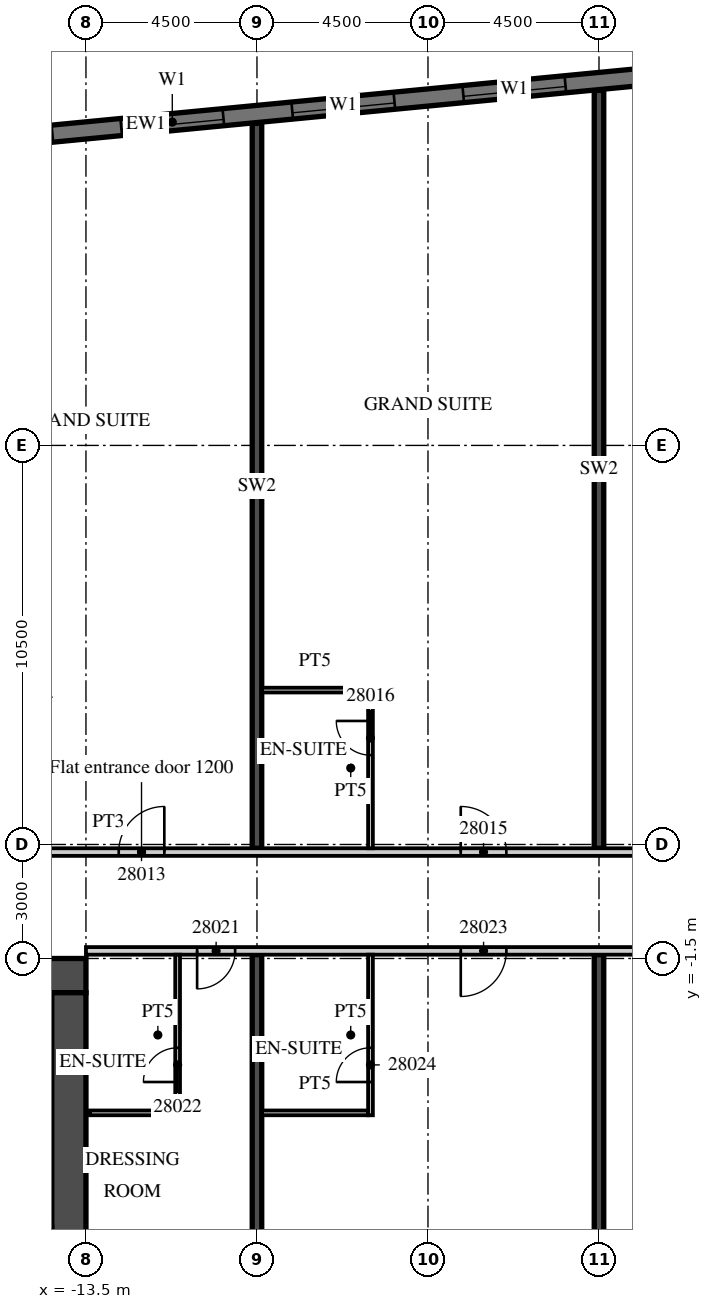
"""IFC4 building model, lengths in metres.
Left out: names, types, materials, properties, quantities, classifications, styles, units other than length and angle.
Written with IfcOpenShell. Run it as: python <this file> out.ifc"""

import sys

from ifc_helpers import new_model, si_unit, direction, frame, frame_2d, origin, place, context, subcontext, project, spatial, rectangle, extrude, element, fill, save


model = new_model("IFC4")
c1 = context("Model", 3, precision=1e-05, world=origin(), true_north=direction((0.0, 1.0)))
c2 = subcontext(c1, "Body", "Model", "MODEL_VIEW")
j1 = project(units=[si_unit("LENGTHUNIT", "METRE"), si_unit("PLANEANGLEUNIT", "RADIAN")], contexts=[c1])
p1 = place(None, origin())
s1 = spatial("IfcSite", under=j1, at=p1, CompositionType="ELEMENT")
p2 = place(p1, origin())
s2 = spatial("IfcBuilding", under=s1, at=p2, CompositionType="ELEMENT")
p3 = place(p2, frame((0.0, 0.0, 127.3)))
s3 = spatial("IfcBuildingStorey", under=s2, at=p3, CompositionType="ELEMENT", Elevation=127.3)
p4 = place(p3, frame((-9.0, -21.777, 0.0), z_axis=(0.0, 0.0, 1.0), x_axis=(0.0, 1.0, 0.0)))
e1 = element("IfcWall", 1, at=p4, inside=s3, PredefinedType="SHEAR", context=c2, shape_type="SweptSolid", body=[
    extrude(rectangle(XDim=20.377, YDim=0.25, at=frame_2d((10.188, 0.0))), origin(), (0.0, 0.0, 1.0), 3.3),
])
p5 = place(p3, frame((-9.0, 1.4, 0.0), z_axis=(0.0, 0.0, 1.0), x_axis=(0.0, 1.0, 0.0)))
e2 = element("IfcWall", 2, at=p5, inside=s3, PredefinedType="SHEAR", context=c2, shape_type="SweptSolid", body=[
    extrude(rectangle(XDim=19.073, YDim=0.25, at=frame_2d((9.537, 0.0))), origin(), (0.0, 0.0, 1.0), 3.3),
])
p6 = place(p3, frame((0.0, -20.91, 0.0), z_axis=(0.0, 0.0, 1.0), x_axis=(0.0, 1.0, 0.0)))
e3 = element("IfcWall", 3, at=p6, inside=s3, PredefinedType="SHEAR", context=c2, shape_type="SweptSolid", body=[
    extrude(rectangle(XDim=19.51, YDim=0.25, at=frame_2d((9.755, 0.0))), origin(), (0.0, 0.0, 1.0), 3.3),
])
p7 = place(p3, frame((0.0, 1.4, 0.0), z_axis=(0.0, 0.0, 1.0), x_axis=(0.0, 1.0, 0.0)))
e4 = element("IfcWall", 4, at=p7, inside=s3, PredefinedType="SHEAR", context=c2, shape_type="SweptSolid", body=[
    extrude(rectangle(XDim=19.94, YDim=0.25, at=frame_2d((9.97, 0.0))), origin(), (0.0, 0.0, 1.0), 3.3),
])
p8 = place(p3, frame((13.521, 22.89, 0.0), z_axis=(0.0, 0.0, 1.0), x_axis=(-0.995396445054, -0.095843190545, 0.0)))
e5 = element("IfcWall", 5, at=p8, inside=s3, PredefinedType="SOLIDWALL", context=c2, shape_type="SweptSolid", body=[
    extrude(rectangle(XDim=51.114, YDim=0.45, at=frame_2d((25.557, 0.0))), origin(), (0.0, 0.0, 1.0), 3.02),
])
p9 = place(p8, frame((0.91, 0.0, 0.45)))
e6 = element("IfcOpeningElement", 6, at=p9, cuts=e5, PredefinedType="OPENING", context=c2, shape_type="SweptSolid", body=[
    extrude(rectangle(XDim=2.7, YDim=2.25, at=frame_2d((1.35, 1.125))), frame((0.0, 0.235, 0.0), z_axis=(0.0, -1.0, 0.0), x_axis=(1.0, 0.0, 0.0)), (0.0, 0.0, 1.0), 0.47),
])
p10 = place(p8, frame((5.431, 0.0, 0.45)))
e7 = element("IfcOpeningElement", 7, at=p10, cuts=e5, PredefinedType="OPENING", context=c2, shape_type="SweptSolid", body=[
    extrude(rectangle(XDim=2.7, YDim=2.25, at=frame_2d((1.35, 1.125))), frame((0.0, 0.235, 0.0), z_axis=(0.0, -1.0, 0.0), x_axis=(1.0, 0.0, 0.0)), (0.0, 0.0, 1.0), 0.47),
])
p11 = place(p8, frame((9.952, 0.0, 0.45)))
e8 = element("IfcOpeningElement", 8, at=p11, cuts=e5, PredefinedType="OPENING", context=c2, shape_type="SweptSolid", body=[
    extrude(rectangle(XDim=2.7, YDim=2.25, at=frame_2d((1.35, 1.125))), frame((0.0, 0.235, 0.0), z_axis=(0.0, -1.0, 0.0), x_axis=(1.0, 0.0, 0.0)), (0.0, 0.0, 1.0), 0.47),
])
p12 = place(p8, frame((14.473, 0.0, 0.45)))
e9 = element("IfcOpeningElement", 9, at=p12, cuts=e5, PredefinedType="OPENING", context=c2, shape_type="SweptSolid", body=[
    extrude(rectangle(XDim=2.7, YDim=2.25, at=frame_2d((1.35, 1.125))), frame((0.0, 0.235, 0.0), z_axis=(0.0, -1.0, 0.0), x_axis=(1.0, 0.0, 0.0)), (0.0, 0.0, 1.0), 0.47),
])
p13 = place(p8, frame((18.994, 0.0, 0.45)))
e10 = element("IfcOpeningElement", 10, at=p13, cuts=e5, PredefinedType="OPENING", context=c2, shape_type="SweptSolid", body=[
    extrude(rectangle(XDim=2.7, YDim=2.25, at=frame_2d((1.35, 1.125))), frame((0.0, 0.235, 0.0), z_axis=(0.0, -1.0, 0.0), x_axis=(1.0, 0.0, 0.0)), (0.0, 0.0, 1.0), 0.47),
])
p14 = place(p8, frame((23.514, 0.0, 0.45)))
e11 = element("IfcOpeningElement", 11, at=p14, cuts=e5, PredefinedType="OPENING", context=c2, shape_type="SweptSolid", body=[
    extrude(rectangle(XDim=2.7, YDim=2.25, at=frame_2d((1.35, 1.125))), frame((0.0, 0.235, 0.0), z_axis=(0.0, -1.0, 0.0), x_axis=(1.0, 0.0, 0.0)), (0.0, 0.0, 1.0), 0.47),
])
p15 = place(p8, frame((28.035, 0.0, 0.45)))
e12 = element("IfcOpeningElement", 12, at=p15, cuts=e5, PredefinedType="OPENING", context=c2, shape_type="SweptSolid", body=[
    extrude(rectangle(XDim=2.7, YDim=2.25, at=frame_2d((1.35, 1.125))), frame((0.0, 0.235, 0.0), z_axis=(0.0, -1.0, 0.0), x_axis=(1.0, 0.0, 0.0)), (0.0, 0.0, 1.0), 0.47),
])
p16 = place(p8, frame((32.556, 0.0, 0.45)))
e13 = element("IfcOpeningElement", 13, at=p16, cuts=e5, PredefinedType="OPENING", context=c2, shape_type="SweptSolid", body=[
    extrude(rectangle(XDim=2.7, YDim=2.25, at=frame_2d((1.35, 1.125))), frame((0.0, 0.235, 0.0), z_axis=(0.0, -1.0, 0.0), x_axis=(1.0, 0.0, 0.0)), (0.0, 0.0, 1.0), 0.47),
])
p17 = place(p8, frame((37.077, 0.0, 0.45)))
e14 = element("IfcOpeningElement", 14, at=p17, cuts=e5, PredefinedType="OPENING", context=c2, shape_type="SweptSolid", body=[
    extrude(rectangle(XDim=2.7, YDim=2.25, at=frame_2d((1.35, 1.125))), frame((0.0, 0.235, 0.0), z_axis=(0.0, -1.0, 0.0), x_axis=(1.0, 0.0, 0.0)), (0.0, 0.0, 1.0), 0.47),
])
p18 = place(p8, frame((41.598, 0.0, 0.45)))
e15 = element("IfcOpeningElement", 15, at=p18, cuts=e5, PredefinedType="OPENING", context=c2, shape_type="SweptSolid", body=[
    extrude(rectangle(XDim=2.7, YDim=2.25, at=frame_2d((1.35, 1.125))), frame((0.0, 0.235, 0.0), z_axis=(0.0, -1.0, 0.0), x_axis=(1.0, 0.0, 0.0)), (0.0, 0.0, 1.0), 0.47),
])
p19 = place(p8, frame((46.118, 0.0, 0.45)))
e16 = element("IfcOpeningElement", 16, at=p19, cuts=e5, PredefinedType="OPENING", context=c2, shape_type="SweptSolid", body=[
    extrude(rectangle(XDim=2.7, YDim=2.25, at=frame_2d((1.35, 1.125))), frame((0.0, 0.235, 0.0), z_axis=(0.0, -1.0, 0.0), x_axis=(1.0, 0.0, 0.0)), (0.0, 0.0, 1.0), 0.47),
])
p20 = place(p3, frame((-39.316, 1.3, 0.0), z_axis=(0.0, 0.0, 1.0), x_axis=(1.0, 0.0, 0.0)))
e17 = element("IfcWall", 17, at=p20, inside=s3, PredefinedType="PARTITIONING", context=c2, shape_type="SweptSolid", body=[
    extrude(rectangle(XDim=52.816, YDim=0.2, at=frame_2d((26.408, 0.0))), origin(), (0.0, 0.0, 1.0), 3.02),
])
p21 = place(p20, frame((0.15, 0.0, 0.0)))
e18 = element("IfcOpeningElement", 18, at=p21, cuts=e17, PredefinedType="OPENING", context=c2, shape_type="SweptSolid", body=[
    extrude(rectangle(XDim=0.9, YDim=2.1, at=frame_2d((0.45, 1.05))), frame((0.0, 0.11, 0.0), z_axis=(0.0, -1.0, 0.0), x_axis=(1.0, 0.0, 0.0)), (0.0, 0.0, 1.0), 0.22),
])
p22 = place(p20, frame((3.891, 0.0, 0.0)))
e19 = element("IfcOpeningElement", 19, at=p22, cuts=e17, PredefinedType="OPENING", context=c2, shape_type="SweptSolid", body=[
    extrude(rectangle(XDim=1.0, YDim=2.1, at=frame_2d((0.5, 1.05))), frame((0.0, 0.11, 0.0), z_axis=(0.0, -1.0, 0.0), x_axis=(1.0, 0.0, 0.0)), (0.0, 0.0, 1.0), 0.22),
])
p23 = place(p20, frame((10.741, 0.0, 0.0)))
e20 = element("IfcOpeningElement", 20, at=p23, cuts=e17, PredefinedType="OPENING", context=c2, shape_type="SweptSolid", body=[
    extrude(rectangle(XDim=1.0, YDim=2.1, at=frame_2d((0.5, 1.05))), frame((0.0, 0.11, 0.0), z_axis=(0.0, -1.0, 0.0), x_axis=(1.0, 0.0, 0.0)), (0.0, 0.0, 1.0), 0.22),
])
p24 = place(p20, frame((15.266, 0.0, 0.0)))
e21 = element("IfcOpeningElement", 21, at=p24, cuts=e17, PredefinedType="OPENING", context=c2, shape_type="SweptSolid", body=[
    extrude(rectangle(XDim=1.0, YDim=2.1, at=frame_2d((0.5, 1.05))), frame((0.0, 0.11, 0.0), z_axis=(0.0, -1.0, 0.0), x_axis=(1.0, 0.0, 0.0)), (0.0, 0.0, 1.0), 0.22),
])
p25 = place(p20, frame((19.741, 0.0, 0.0)))
e22 = element("IfcOpeningElement", 22, at=p25, cuts=e17, PredefinedType="OPENING", context=c2, shape_type="SweptSolid", body=[
    extrude(rectangle(XDim=1.0, YDim=2.1, at=frame_2d((0.5, 1.05))), frame((0.0, 0.11, 0.0), z_axis=(0.0, -1.0, 0.0), x_axis=(1.0, 0.0, 0.0)), (0.0, 0.0, 1.0), 0.22),
])
p26 = place(p20, frame((26.678, 0.0, 0.0)))
e23 = element("IfcOpeningElement", 23, at=p26, cuts=e17, PredefinedType="OPENING", context=c2, shape_type="SweptSolid", body=[
    extrude(rectangle(XDim=1.2, YDim=2.1, at=frame_2d((0.6, 1.05))), frame((0.0, 0.11, 0.0), z_axis=(0.0, -1.0, 0.0), x_axis=(1.0, 0.0, 0.0)), (0.0, 0.0, 1.0), 0.22),
])
p27 = place(p20, frame((35.678, 0.0, 0.0)))
e24 = element("IfcOpeningElement", 24, at=p27, cuts=e17, PredefinedType="OPENING", context=c2, shape_type="SweptSolid", body=[
    extrude(rectangle(XDim=1.2, YDim=2.1, at=frame_2d((0.6, 1.05))), frame((0.0, 0.11, 0.0), z_axis=(0.0, -1.0, 0.0), x_axis=(1.0, 0.0, 0.0)), (0.0, 0.0, 1.0), 0.22),
])
p28 = place(p20, frame((41.754, 0.0, 0.0)))
e25 = element("IfcOpeningElement", 25, at=p28, cuts=e17, PredefinedType="OPENING", context=c2, shape_type="SweptSolid", body=[
    extrude(rectangle(XDim=1.2, YDim=2.1, at=frame_2d((0.6, 1.05))), frame((0.0, 0.11, 0.0), z_axis=(0.0, -1.0, 0.0), x_axis=(1.0, 0.0, 0.0)), (0.0, 0.0, 1.0), 0.22),
])
p29 = place(p20, frame((51.241, 0.0, 0.0)))
e26 = element("IfcOpeningElement", 26, at=p29, cuts=e17, PredefinedType="OPENING", context=c2, shape_type="SweptSolid", body=[
    extrude(rectangle(XDim=1.0, YDim=2.1, at=frame_2d((0.5, 1.05))), frame((0.0, 0.11, 0.0), z_axis=(0.0, -1.0, 0.0), x_axis=(1.0, 0.0, 0.0)), (0.0, 0.0, 1.0), 0.22),
])
p30 = place(p3, frame((-6.013, 1.4, 0.0), z_axis=(0.0, 0.0, 1.0), x_axis=(0.0, 1.0, 0.0)))
e27 = element("IfcWall", 27, at=p30, inside=s3, PredefinedType="PARTITIONING", context=c2, shape_type="SweptSolid", body=[
    extrude(rectangle(XDim=4.225, YDim=0.125, at=frame_2d((2.113, 0.0))), origin(), (0.0, 0.0, 1.0), 3.02),
])
p31 = place(p30, frame((2.45, 0.0, 0.0)))
e28 = element("IfcOpeningElement", 28, at=p31, cuts=e27, PredefinedType="OPENING", context=c2, shape_type="SweptSolid", body=[
    extrude(rectangle(XDim=0.9, YDim=2.1, at=frame_2d((0.45, 1.05))), frame((0.0, 0.073, 0.0), z_axis=(0.0, -1.0, 0.0), x_axis=(1.0, 0.0, 0.0)), (0.0, 0.0, 1.0), 0.145),
])
p32 = place(p3, frame((-8.875, 5.562, 0.0), z_axis=(0.0, 0.0, 1.0), x_axis=(1.0, 0.0, 0.0)))
e29 = element("IfcWall", 29, at=p32, inside=s3, PredefinedType="PARTITIONING", context=c2, shape_type="SweptSolid", body=[
    extrude(rectangle(XDim=2.8, YDim=0.125, at=frame_2d((1.4, 0.0))), origin(), (0.0, 0.0, 1.0), 3.02),
])
p33 = place(p3, frame((-13.5, -1.3, 0.0), z_axis=(0.0, 0.0, 1.0), x_axis=(1.0, 0.0, 0.0)))
e30 = element("IfcWall", 30, at=p33, inside=s3, PredefinedType="PARTITIONING", context=c2, shape_type="SweptSolid", body=[
    extrude(rectangle(XDim=60.932, YDim=0.2, at=frame_2d((30.466, 0.0))), origin(), (0.0, 0.0, 1.0), 3.02),
])
p34 = place(p33, frame((2.925, 0.0, 0.0)))
e31 = element("IfcOpeningElement", 31, at=p34, cuts=e30, PredefinedType="OPENING", context=c2, shape_type="SweptSolid", body=[
    extrude(rectangle(XDim=1.0, YDim=2.1, at=frame_2d((0.5, 1.05))), frame((0.0, 0.11, 0.0), z_axis=(0.0, -1.0, 0.0), x_axis=(1.0, 0.0, 0.0)), (0.0, 0.0, 1.0), 0.22),
])
p35 = place(p33, frame((9.863, 0.0, 0.0)))
e32 = element("IfcOpeningElement", 32, at=p35, cuts=e30, PredefinedType="OPENING", context=c2, shape_type="SweptSolid", body=[
    extrude(rectangle(XDim=1.2, YDim=2.1, at=frame_2d((0.6, 1.05))), frame((0.0, 0.11, 0.0), z_axis=(0.0, -1.0, 0.0), x_axis=(1.0, 0.0, 0.0)), (0.0, 0.0, 1.0), 0.22),
])
p36 = place(p33, frame((15.938, 0.0, 0.0)))
e33 = element("IfcOpeningElement", 33, at=p36, cuts=e30, PredefinedType="OPENING", context=c2, shape_type="SweptSolid", body=[
    extrude(rectangle(XDim=1.2, YDim=2.1, at=frame_2d((0.6, 1.05))), frame((0.0, 0.11, 0.0), z_axis=(0.0, -1.0, 0.0), x_axis=(1.0, 0.0, 0.0)), (0.0, 0.0, 1.0), 0.22),
])
p37 = place(p33, frame((27.862, 0.0, 0.0)))
e34 = element("IfcOpeningElement", 34, at=p37, cuts=e30, PredefinedType="OPENING", context=c2, shape_type="SweptSolid", body=[
    extrude(rectangle(XDim=1.2, YDim=2.1, at=frame_2d((0.6, 1.05))), frame((0.0, 0.11, 0.0), z_axis=(0.0, -1.0, 0.0), x_axis=(1.0, 0.0, 0.0)), (0.0, 0.0, 1.0), 0.22),
])
p38 = place(p33, frame((34.45, 0.0, 0.0)))
e35 = element("IfcOpeningElement", 35, at=p38, cuts=e30, PredefinedType="OPENING", context=c2, shape_type="SweptSolid", body=[
    extrude(rectangle(XDim=1.0, YDim=2.1, at=frame_2d((0.5, 1.05))), frame((0.0, 0.11, 0.0), z_axis=(0.0, -1.0, 0.0), x_axis=(1.0, 0.0, 0.0)), (0.0, 0.0, 1.0), 0.22),
])
p39 = place(p33, frame((36.55, 0.0, 0.0)))
e36 = element("IfcOpeningElement", 36, at=p39, cuts=e30, PredefinedType="OPENING", context=c2, shape_type="SweptSolid", body=[
    extrude(rectangle(XDim=1.0, YDim=2.1, at=frame_2d((0.5, 1.05))), frame((0.0, 0.11, 0.0), z_axis=(0.0, -1.0, 0.0), x_axis=(1.0, 0.0, 0.0)), (0.0, 0.0, 1.0), 0.22),
])
p40 = place(p33, frame((41.075, 0.0, 0.0)))
e37 = element("IfcOpeningElement", 37, at=p40, cuts=e30, PredefinedType="OPENING", context=c2, shape_type="SweptSolid", body=[
    extrude(rectangle(XDim=1.0, YDim=2.1, at=frame_2d((0.5, 1.05))), frame((0.0, 0.11, 0.0), z_axis=(0.0, -1.0, 0.0), x_axis=(1.0, 0.0, 0.0)), (0.0, 0.0, 1.0), 0.22),
])
p41 = place(p33, frame((45.55, 0.0, 0.0)))
e38 = element("IfcOpeningElement", 38, at=p41, cuts=e30, PredefinedType="OPENING", context=c2, shape_type="SweptSolid", body=[
    extrude(rectangle(XDim=1.0, YDim=2.1, at=frame_2d((0.5, 1.05))), frame((0.0, 0.11, 0.0), z_axis=(0.0, -1.0, 0.0), x_axis=(1.0, 0.0, 0.0)), (0.0, 0.0, 1.0), 0.22),
])
p42 = place(p33, frame((50.075, 0.0, 0.0)))
e39 = element("IfcOpeningElement", 39, at=p42, cuts=e30, PredefinedType="OPENING", context=c2, shape_type="SweptSolid", body=[
    extrude(rectangle(XDim=1.0, YDim=2.1, at=frame_2d((0.5, 1.05))), frame((0.0, 0.11, 0.0), z_axis=(0.0, -1.0, 0.0), x_axis=(1.0, 0.0, 0.0)), (0.0, 0.0, 1.0), 0.22),
])
p43 = place(p33, frame((54.575, 0.0, 0.0)))
e40 = element("IfcOpeningElement", 40, at=p43, cuts=e30, PredefinedType="OPENING", context=c2, shape_type="SweptSolid", body=[
    extrude(rectangle(XDim=1.0, YDim=2.1, at=frame_2d((0.5, 1.05))), frame((0.0, 0.11, 0.0), z_axis=(0.0, -1.0, 0.0), x_axis=(1.0, 0.0, 0.0)), (0.0, 0.0, 1.0), 0.22),
])
p44 = place(p33, frame((59.882, 0.0, 0.0)))
e41 = element("IfcOpeningElement", 41, at=p44, cuts=e30, PredefinedType="OPENING", context=c2, shape_type="SweptSolid", body=[
    extrude(rectangle(XDim=0.9, YDim=2.1, at=frame_2d((0.45, 1.05))), frame((0.0, 0.11, 0.0), z_axis=(0.0, -1.0, 0.0), x_axis=(1.0, 0.0, 0.0)), (0.0, 0.0, 1.0), 0.22),
])
p45 = place(p3, frame((-11.088, -5.625, 0.0), z_axis=(0.0, 0.0, 1.0), x_axis=(0.0, 1.0, 0.0)))
e42 = element("IfcWall", 42, at=p45, inside=s3, PredefinedType="PARTITIONING", context=c2, shape_type="SweptSolid", body=[
    extrude(rectangle(XDim=4.225, YDim=0.125, at=frame_2d((2.113, 0.0))), origin(), (0.0, 0.0, 1.0), 3.02),
])
p46 = place(p45, frame((0.875, 0.0, 0.0)))
e43 = element("IfcOpeningElement", 43, at=p46, cuts=e42, PredefinedType="OPENING", context=c2, shape_type="SweptSolid", body=[
    extrude(rectangle(XDim=0.9, YDim=2.1, at=frame_2d((0.45, 1.05))), frame((0.0, 0.073, 0.0), z_axis=(0.0, -1.0, 0.0), x_axis=(1.0, 0.0, 0.0)), (0.0, 0.0, 1.0), 0.145),
])
p47 = place(p3, frame((-13.4, -5.562, 0.0), z_axis=(0.0, 0.0, 1.0), x_axis=(1.0, 0.0, 0.0)))
e44 = element("IfcWall", 44, at=p47, inside=s3, PredefinedType="PARTITIONING", context=c2, shape_type="SweptSolid", body=[
    extrude(rectangle(XDim=2.25, YDim=0.125, at=frame_2d((1.125, 0.0))), origin(), (0.0, 0.0, 1.0), 3.02),
])
p48 = place(p3, frame((-6.013, -5.625, 0.0), z_axis=(0.0, 0.0, 1.0), x_axis=(0.0, 1.0, 0.0)))
e45 = element("IfcWall", 45, at=p48, inside=s3, PredefinedType="PARTITIONING", context=c2, shape_type="SweptSolid", body=[
    extrude(rectangle(XDim=4.225, YDim=0.125, at=frame_2d((2.113, 0.0))), origin(), (0.0, 0.0, 1.0), 3.02),
])
p49 = place(p48, frame((0.875, 0.0, 0.0)))
e46 = element("IfcOpeningElement", 46, at=p49, cuts=e45, PredefinedType="OPENING", context=c2, shape_type="SweptSolid", body=[
    extrude(rectangle(XDim=0.9, YDim=2.1, at=frame_2d((0.45, 1.05))), frame((0.0, 0.073, 0.0), z_axis=(0.0, -1.0, 0.0), x_axis=(1.0, 0.0, 0.0)), (0.0, 0.0, 1.0), 0.145),
])
p50 = place(p3, frame((-8.875, -5.562, 0.0), z_axis=(0.0, 0.0, 1.0), x_axis=(1.0, 0.0, 0.0)))
e47 = element("IfcWall", 47, at=p50, inside=s3, PredefinedType="PARTITIONING", context=c2, shape_type="SweptSolid", body=[
    extrude(rectangle(XDim=2.8, YDim=0.125, at=frame_2d((1.4, 0.0))), origin(), (0.0, 0.0, 1.0), 3.02),
])
p51 = place(p3, frame((-31.5, -1.95, 0.0), z_axis=(0.0, 0.0, 1.0), x_axis=(1.0, 0.0, 0.0)))
e48 = element("IfcWall", 48, at=p51, inside=s3, PredefinedType="SHEAR", context=c2, shape_type="SweptSolid", body=[
    extrude(rectangle(XDim=18.0, YDim=0.9, at=frame_2d((9.0, 0.0))), origin(), (0.0, 0.0, 1.0), 3.02),
])
p52 = place(p51, frame((14.725, 0.0, 0.0)))
e49 = element("IfcOpeningElement", 49, at=p52, cuts=e48, PredefinedType="OPENING", context=c2, shape_type="SweptSolid", body=[
    extrude(rectangle(XDim=1.8, YDim=2.1, at=frame_2d((0.9, 1.05))), frame((0.0, 0.46, 0.0), z_axis=(0.0, -1.0, 0.0), x_axis=(1.0, 0.0, 0.0)), (0.0, 0.0, 1.0), 0.92),
])
p53 = place(p3, frame((-13.95, -14.6, 0.0), z_axis=(0.0, 0.0, 1.0), x_axis=(0.0, 1.0, 0.0)))
e50 = element("IfcWall", 50, at=p53, inside=s3, PredefinedType="SHEAR", context=c2, shape_type="SweptSolid", body=[
    extrude(rectangle(XDim=12.2, YDim=0.9, at=frame_2d((6.1, 0.0))), origin(), (0.0, 0.0, 1.0), 3.02),
])
p54 = place(p12, origin())
e51 = element("IfcWindow", 51, at=p54, inside=s3, PartitioningType="SINGLE_PANEL", PredefinedType="WINDOW", context=c2, shape_type="SweptSolid", body=[
    extrude(rectangle(XDim=2.7, YDim=2.25, at=frame_2d((1.35, 1.125))), frame((0.0, 0.09, 0.0), z_axis=(0.0, -1.0, 0.0), x_axis=(1.0, 0.0, 0.0)), (0.0, 0.0, 1.0), 0.06),
])
fill(e9, e51)
p55 = place(p13, origin())
e52 = element("IfcWindow", 52, at=p55, inside=s3, PartitioningType="SINGLE_PANEL", PredefinedType="WINDOW", context=c2, shape_type="SweptSolid", body=[
    extrude(rectangle(XDim=2.7, YDim=2.25, at=frame_2d((1.35, 1.125))), frame((0.0, 0.09, 0.0), z_axis=(0.0, -1.0, 0.0), x_axis=(1.0, 0.0, 0.0)), (0.0, 0.0, 1.0), 0.06),
])
fill(e10, e52)
p56 = place(p14, origin())
e53 = element("IfcWindow", 53, at=p56, inside=s3, PartitioningType="SINGLE_PANEL", PredefinedType="WINDOW", context=c2, shape_type="SweptSolid", body=[
    extrude(rectangle(XDim=2.7, YDim=2.25, at=frame_2d((1.35, 1.125))), frame((0.0, 0.09, 0.0), z_axis=(0.0, -1.0, 0.0), x_axis=(1.0, 0.0, 0.0)), (0.0, 0.0, 1.0), 0.06),
])
fill(e11, e53)
p57 = place(p15, origin())
e54 = element("IfcWindow", 54, at=p57, inside=s3, PartitioningType="SINGLE_PANEL", PredefinedType="WINDOW", context=c2, shape_type="SweptSolid", body=[
    extrude(rectangle(XDim=2.7, YDim=2.25, at=frame_2d((1.35, 1.125))), frame((0.0, 0.09, 0.0), z_axis=(0.0, -1.0, 0.0), x_axis=(1.0, 0.0, 0.0)), (0.0, 0.0, 1.0), 0.06),
])
fill(e12, e54)
p58 = place(p26, origin())
e55 = element("IfcDoor", 55, at=p58, inside=s3, OperationType="SINGLE_SWING_RIGHT", PredefinedType="DOOR", context=c2, shape_type="SweptSolid", body=[
    extrude(rectangle(XDim=1.2, YDim=2.1, at=frame_2d((0.6, 1.05))), frame((0.0, 0.025, 0.0), z_axis=(0.0, -1.0, 0.0), x_axis=(1.0, 0.0, 0.0)), (0.0, 0.0, 1.0), 0.05),
])
fill(e23, e55)
p59 = place(p27, origin())
e56 = element("IfcDoor", 56, at=p59, inside=s3, OperationType="SINGLE_SWING_LEFT", PredefinedType="DOOR", context=c2, shape_type="SweptSolid", body=[
    extrude(rectangle(XDim=1.2, YDim=2.1, at=frame_2d((0.6, 1.05))), frame((0.0, 0.025, 0.0), z_axis=(0.0, -1.0, 0.0), x_axis=(1.0, 0.0, 0.0)), (0.0, 0.0, 1.0), 0.05),
])
fill(e24, e56)
p60 = place(p31, origin())
e57 = element("IfcDoor", 57, at=p60, inside=s3, OperationType="SINGLE_SWING_RIGHT", PredefinedType="DOOR", context=c2, shape_type="SweptSolid", body=[
    extrude(rectangle(XDim=0.9, YDim=2.1, at=frame_2d((0.45, 1.05))), frame((0.0, 0.025, 0.0), z_axis=(0.0, -1.0, 0.0), x_axis=(1.0, 0.0, 0.0)), (0.0, 0.0, 1.0), 0.05),
])
fill(e28, e57)
p61 = place(p34, origin())
e58 = element("IfcDoor", 58, at=p61, inside=s3, OperationType="SINGLE_SWING_LEFT", PredefinedType="DOOR", context=c2, shape_type="SweptSolid", body=[
    extrude(rectangle(XDim=1.0, YDim=2.1, at=frame_2d((0.5, 1.05))), frame((0.0, 0.025, 0.0), z_axis=(0.0, -1.0, 0.0), x_axis=(1.0, 0.0, 0.0)), (0.0, 0.0, 1.0), 0.05),
])
fill(e31, e58)
p62 = place(p46, origin())
e59 = element("IfcDoor", 59, at=p62, inside=s3, OperationType="SINGLE_SWING_LEFT", PredefinedType="DOOR", context=c2, shape_type="SweptSolid", body=[
    extrude(rectangle(XDim=0.9, YDim=2.1, at=frame_2d((0.45, 1.05))), frame((0.0, 0.025, 0.0), z_axis=(0.0, -1.0, 0.0), x_axis=(1.0, 0.0, 0.0)), (0.0, 0.0, 1.0), 0.05),
])
fill(e43, e59)
p63 = place(p35, origin())
e60 = element("IfcDoor", 60, at=p63, inside=s3, OperationType="SINGLE_SWING_LEFT", PredefinedType="DOOR", context=c2, shape_type="SweptSolid", body=[
    extrude(rectangle(XDim=1.2, YDim=2.1, at=frame_2d((0.6, 1.05))), frame((0.0, 0.025, 0.0), z_axis=(0.0, -1.0, 0.0), x_axis=(1.0, 0.0, 0.0)), (0.0, 0.0, 1.0), 0.05),
])
fill(e32, e60)
p64 = place(p49, origin())
e61 = element("IfcDoor", 61, at=p64, inside=s3, OperationType="SINGLE_SWING_LEFT", PredefinedType="DOOR", context=c2, shape_type="SweptSolid", body=[
    extrude(rectangle(XDim=0.9, YDim=2.1, at=frame_2d((0.45, 1.05))), frame((0.0, 0.025, 0.0), z_axis=(0.0, -1.0, 0.0), x_axis=(1.0, 0.0, 0.0)), (0.0, 0.0, 1.0), 0.05),
])
fill(e46, e61)
save(model, sys.argv[1])
